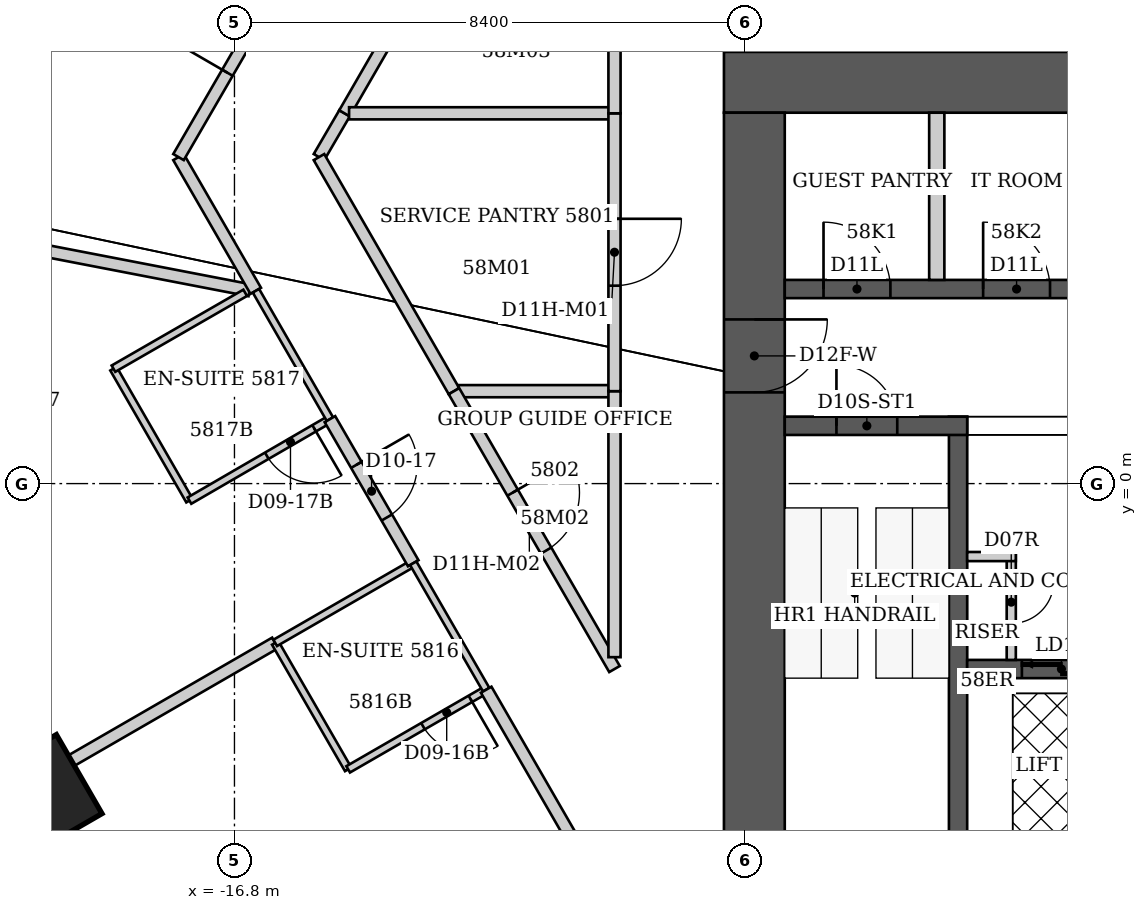
"""IFC4 building model, lengths in metres.
Left out: names, types, materials, properties, quantities, classifications, styles, units other than length and angle.
Written with IfcOpenShell. Run it as: python <this file> out.ifc"""

import sys

from ifc_helpers import new_model, si_unit, direction, frame, frame_2d, origin, origin_2d, place, context, subcontext, project, spatial, rectangle, extrude, element, fill, save


model = new_model("IFC4")
c1 = context("Model", 3, precision=1e-05, world=origin(), true_north=direction((0.0, 1.0)))
c2 = subcontext(c1, "Body", "Model", "MODEL_VIEW")
j1 = project(units=[si_unit("LENGTHUNIT", "METRE"), si_unit("PLANEANGLEUNIT", "RADIAN")], contexts=[c1])
p1 = place(None, origin())
s1 = spatial("IfcSite", under=j1, at=p1, CompositionType="ELEMENT")
p2 = place(p1, origin())
s2 = spatial("IfcBuilding", under=s1, at=p2, CompositionType="ELEMENT")
p3 = place(p2, frame((0.0, 0.0, 232.6)))
s3 = spatial("IfcBuildingStorey", under=s2, at=p3, CompositionType="ELEMENT", Elevation=232.6)
p4 = place(p3, frame((-20.003, -5.153, -0.052), z_axis=(0.054858228661, 0.014110017291, 0.998394452188), x_axis=(-0.86451511653, -0.499636332881, 0.054563249145)))
e1 = element("IfcColumn", 1, at=p4, inside=s3, PredefinedType="COLUMN", context=c2, shape_type="SweptSolid", body=[
    extrude(rectangle(XDim=1.5, YDim=1.5, at=origin_2d()), origin(), (0.0, 0.0, 1.0), 3.858),
])
p5 = place(p3, frame((-8.75, 6.6, 0.0), z_axis=(0.0, 0.0, 1.0), x_axis=(1.0, 0.0, 0.0)))
e2 = element("IfcWall", 2, at=p5, inside=s3, PredefinedType="SHEAR", context=c2, shape_type="SweptSolid", body=[
    extrude(rectangle(XDim=17.5, YDim=1.0, at=frame_2d((8.75, 0.0))), origin(), (0.0, 0.0, 1.0), 3.8),
])
p6 = place(p5, frame((6.887, 0.0, 0.0)))
e3 = element("IfcOpeningElement", 3, at=p6, cuts=e2, PredefinedType="OPENING", context=c2, shape_type="SweptSolid", body=[
    extrude(rectangle(XDim=1.1, YDim=2.1, at=frame_2d((0.55, 1.05))), frame((0.0, 0.5, 0.0), z_axis=(0.0, -1.0, 0.0), x_axis=(1.0, 0.0, 0.0)), (0.0, 0.0, 1.0), 1.0),
])
p7 = place(p5, frame((9.512, 0.0, 0.0)))
e4 = element("IfcOpeningElement", 4, at=p7, cuts=e2, PredefinedType="OPENING", context=c2, shape_type="SweptSolid", body=[
    extrude(rectangle(XDim=1.1, YDim=2.1, at=frame_2d((0.55, 1.05))), frame((0.0, 0.5, 0.0), z_axis=(0.0, -1.0, 0.0), x_axis=(1.0, 0.0, 0.0)), (0.0, 0.0, 1.0), 1.0),
])
p8 = place(p5, frame((12.137, 0.0, 0.0)))
e5 = element("IfcOpeningElement", 5, at=p8, cuts=e2, PredefinedType="OPENING", context=c2, shape_type="SweptSolid", body=[
    extrude(rectangle(XDim=1.1, YDim=2.1, at=frame_2d((0.55, 1.05))), frame((0.0, 0.5, 0.0), z_axis=(0.0, -1.0, 0.0), x_axis=(1.0, 0.0, 0.0)), (0.0, 0.0, 1.0), 1.0),
])
p9 = place(p5, frame((14.762, 0.0, 0.0)))
e6 = element("IfcOpeningElement", 6, at=p9, cuts=e2, PredefinedType="OPENING", context=c2, shape_type="SweptSolid", body=[
    extrude(rectangle(XDim=1.1, YDim=2.1, at=frame_2d((0.55, 1.05))), frame((0.0, 0.5, 0.0), z_axis=(0.0, -1.0, 0.0), x_axis=(1.0, 0.0, 0.0)), (0.0, 0.0, 1.0), 1.0),
])
p10 = place(p3, frame((-8.25, -6.1, 0.0), z_axis=(0.0, 0.0, 1.0), x_axis=(0.0, 1.0, 0.0)))
e7 = element("IfcWall", 7, at=p10, inside=s3, PredefinedType="SHEAR", context=c2, shape_type="SweptSolid", body=[
    extrude(rectangle(XDim=12.2, YDim=1.0, at=frame_2d((6.1, 0.0))), origin(), (0.0, 0.0, 1.0), 3.8),
])
p11 = place(p10, frame((7.6, 0.0, 0.0)))
e8 = element("IfcOpeningElement", 8, at=p11, cuts=e7, PredefinedType="OPENING", context=c2, shape_type="SweptSolid", body=[
    extrude(rectangle(XDim=1.2, YDim=2.2, at=frame_2d((0.6, 1.1))), frame((0.0, 0.5, 0.0), z_axis=(0.0, -1.0, 0.0), x_axis=(1.0, 0.0, 0.0)), (0.0, 0.0, 1.0), 1.0),
])
p12 = place(p3, frame((-4.9, -6.1, 0.0), z_axis=(0.0, 0.0, 1.0), x_axis=(0.0, 1.0, 0.0)))
e9 = element("IfcWall", 9, at=p12, inside=s3, PredefinedType="SHEAR", context=c2, shape_type="SweptSolid", body=[
    extrude(rectangle(XDim=7.2, YDim=0.3, at=frame_2d((3.6, 0.0))), origin(), (0.0, 0.0, 1.0), 3.8),
])
p13 = place(p3, frame((-7.75, 0.95, 0.0), z_axis=(0.0, 0.0, 1.0), x_axis=(1.0, 0.0, 0.0)))
e10 = element("IfcWall", 10, at=p13, inside=s3, PredefinedType="SHEAR", context=c2, shape_type="SweptSolid", body=[
    extrude(rectangle(XDim=3.0, YDim=0.3, at=frame_2d((1.5, 0.0))), origin(), (0.0, 0.0, 1.0), 3.8),
])
p14 = place(p13, frame((0.85, 0.0, 0.0)))
e11 = element("IfcOpeningElement", 11, at=p14, cuts=e10, PredefinedType="OPENING", context=c2, shape_type="SweptSolid", body=[
    extrude(rectangle(XDim=1.0, YDim=2.2, at=frame_2d((0.5, 1.1))), frame((0.0, 0.15, 0.0), z_axis=(0.0, -1.0, 0.0), x_axis=(1.0, 0.0, 0.0)), (0.0, 0.0, 1.0), 0.3),
])
p15 = place(p3, frame((-4.75, -3.05, 0.0), z_axis=(0.0, 0.0, 1.0), x_axis=(1.0, 0.0, 0.0)))
e12 = element("IfcWall", 12, at=p15, inside=s3, PredefinedType="SHEAR", context=c2, shape_type="SweptSolid", body=[
    extrude(rectangle(XDim=3.1, YDim=0.3, at=frame_2d((1.55, 0.0))), origin(), (0.0, 0.0, 1.0), 3.8),
])
p16 = place(p15, frame((0.9, 0.0, 0.0)))
e13 = element("IfcOpeningElement", 13, at=p16, cuts=e12, PredefinedType="OPENING", context=c2, shape_type="SweptSolid", body=[
    extrude(rectangle(XDim=1.3, YDim=2.1, at=frame_2d((0.65, 1.05))), frame((0.0, 0.15, 0.0), z_axis=(0.0, -1.0, 0.0), x_axis=(1.0, 0.0, 0.0)), (0.0, 0.0, 1.0), 0.3),
])
p17 = place(p3, frame((-7.75, 3.2, 0.0), z_axis=(0.0, 0.0, 1.0), x_axis=(1.0, 0.0, 0.0)))
e14 = element("IfcWall", 14, at=p17, inside=s3, PredefinedType="SHEAR", context=c2, shape_type="SweptSolid", body=[
    extrude(rectangle(XDim=15.5, YDim=0.3, at=frame_2d((7.75, 0.0))), origin(), (0.0, 0.0, 1.0), 3.8),
])
p18 = place(p17, frame((0.637, 0.0, 0.0)))
e15 = element("IfcOpeningElement", 15, at=p18, cuts=e14, PredefinedType="OPENING", context=c2, shape_type="SweptSolid", body=[
    extrude(rectangle(XDim=1.1, YDim=2.2, at=frame_2d((0.55, 1.1))), frame((0.0, 0.15, 0.0), z_axis=(0.0, -1.0, 0.0), x_axis=(1.0, 0.0, 0.0)), (0.0, 0.0, 1.0), 0.3),
])
p19 = place(p17, frame((3.262, 0.0, 0.0)))
e16 = element("IfcOpeningElement", 16, at=p19, cuts=e14, PredefinedType="OPENING", context=c2, shape_type="SweptSolid", body=[
    extrude(rectangle(XDim=1.1, YDim=2.2, at=frame_2d((0.55, 1.1))), frame((0.0, 0.15, 0.0), z_axis=(0.0, -1.0, 0.0), x_axis=(1.0, 0.0, 0.0)), (0.0, 0.0, 1.0), 0.3),
])
p20 = place(p3, frame((-5.25, 3.35, 0.0), z_axis=(0.0, 0.0, 1.0), x_axis=(0.0, 1.0, 0.0)))
e17 = element("IfcWall", 17, at=p20, inside=s3, PredefinedType="PARTITIONING", context=c2, shape_type="SweptSolid", body=[
    extrude(rectangle(XDim=2.75, YDim=0.25, at=frame_2d((1.375, 0.0))), origin(), (0.0, 0.0, 1.0), 3.8),
])
p21 = place(p3, frame((-27.041, 5.204, 0.0), z_axis=(0.0, 0.0, 1.0), x_axis=(0.981884490433, -0.18948046719, 0.0)))
e18 = element("IfcWall", 18, at=p21, inside=s3, PredefinedType="PARTITIONING", context=c2, shape_type="SweptSolid", body=[
    extrude(rectangle(XDim=10.684, YDim=0.2, at=frame_2d((5.342, 0.0))), origin(), (0.0, 0.0, 1.0), 3.64),
])
p22 = place(p3, frame((-21.116, -5.5, 0.0), z_axis=(0.0, 0.0, 1.0), x_axis=(0.865919350456, 0.50018364478, 0.0)))
e19 = element("IfcWall", 19, at=p22, inside=s3, PredefinedType="PARTITIONING", context=c2, shape_type="SweptSolid", body=[
    extrude(rectangle(XDim=5.758, YDim=0.2, at=frame_2d((2.879, 0.0))), origin(), (0.0, 0.0, 1.0), 3.64),
])
p23 = place(p3, frame((-18.79, 1.89, 0.0), z_axis=(0.0, 0.0, 1.0), x_axis=(0.499159685399, -0.866510016372, 0.0)))
e20 = element("IfcWall", 20, at=p23, inside=s3, PredefinedType="PARTITIONING", context=c2, shape_type="SweptSolid", body=[
    extrude(rectangle(XDim=2.504, YDim=0.12, at=frame_2d((1.252, 0.0))), origin(), (0.0, 0.0, 1.0), 3.64),
])
p24 = place(p3, frame((-17.72, 5.37, 0.0), z_axis=(0.0, 0.0, 1.0), x_axis=(0.499922110319, -0.866070368743, 0.0)))
e21 = element("IfcWall", 21, at=p24, inside=s3, PredefinedType="PARTITIONING", context=c2, shape_type="SweptSolid", body=[
    extrude(rectangle(XDim=2.541, YDim=0.2, at=frame_2d((1.27, 0.0))), origin(), (0.0, 0.0, 1.0), 3.64),
])
p25 = place(p3, frame((-17.72, 5.37, 0.0), z_axis=(0.0, 0.0, 1.0), x_axis=(0.501491408171, 0.865162624904, 0.0)))
e22 = element("IfcWall", 22, at=p25, inside=s3, PredefinedType="PARTITIONING", context=c2, shape_type="SweptSolid", body=[
    extrude(rectangle(XDim=4.207, YDim=0.2, at=frame_2d((2.104, 0.0))), origin(), (0.0, 0.0, 1.0), 3.64),
])
p26 = place(p25, frame((1.604, 0.0, 0.0)))
e23 = element("IfcOpeningElement", 23, at=p26, cuts=e22, PredefinedType="OPENING", context=c2, shape_type="SweptSolid", body=[
    extrude(rectangle(XDim=1.0, YDim=2.13, at=frame_2d((0.5, 1.065))), frame((0.0, 0.1, 0.0), z_axis=(0.0, -1.0, 0.0), x_axis=(1.0, 0.0, 0.0)), (0.0, 0.0, 1.0), 0.2),
])
p27 = place(p3, frame((-17.54, -0.28, 0.0), z_axis=(0.0, 0.0, 1.0), x_axis=(0.86498992408, 0.501789229896, 0.0)))
e24 = element("IfcWall", 24, at=p27, inside=s3, PredefinedType="PARTITIONING", context=c2, shape_type="SweptSolid", body=[
    extrude(rectangle(XDim=2.671, YDim=0.12, at=frame_2d((1.335, 0.0))), origin(), (0.0, 0.0, 1.0), 3.64),
])
p28 = place(p27, frame((1.47, 0.0, 0.0)))
e25 = element("IfcOpeningElement", 25, at=p28, cuts=e24, PredefinedType="OPENING", context=c2, shape_type="SweptSolid", body=[
    extrude(rectangle(XDim=0.9, YDim=2.03, at=frame_2d((0.45, 1.015))), frame((0.0, 0.06, 0.0), z_axis=(0.0, -1.0, 0.0), x_axis=(1.0, 0.0, 0.0)), (0.0, 0.0, 1.0), 0.12),
])
p29 = place(p3, frame((-16.624, 3.138, 0.0), z_axis=(0.0, 0.0, 1.0), x_axis=(-0.866525185869, -0.499133351175, 0.0)))
e26 = element("IfcWall", 26, at=p29, inside=s3, PredefinedType="PARTITIONING", context=c2, shape_type="SweptSolid", body=[
    extrude(rectangle(XDim=2.5, YDim=0.12, at=frame_2d((1.25, 0.0))), origin(), (0.0, 0.0, 1.0), 3.038),
])
p30 = place(p3, frame((-16.447, 3.172, 0.0), z_axis=(0.0, 0.0, 1.0), x_axis=(0.499242543719, -0.86646227993, 0.0)))
e27 = element("IfcWall", 27, at=p30, inside=s3, PredefinedType="PARTITIONING", context=c2, shape_type="SweptSolid", body=[
    extrude(rectangle(XDim=2.437, YDim=0.12, at=frame_2d((1.219, 0.0))), origin(), (0.0, 0.0, 1.0), 3.64),
])
p31 = place(p3, frame((-16.13, -2.62, 0.0), z_axis=(0.0, 0.0, 1.0), x_axis=(0.499737123639, -0.866177122335, 0.0)))
e28 = element("IfcWall", 28, at=p31, inside=s3, PredefinedType="PARTITIONING", context=c2, shape_type="SweptSolid", body=[
    extrude(rectangle(XDim=2.401, YDim=0.12, at=frame_2d((1.201, 0.0))), origin(), (0.0, 0.0, 1.0), 3.64),
])
p32 = place(p3, frame((-16.13, -2.62, 0.0), z_axis=(0.0, 0.0, 1.0), x_axis=(0.866114241029, 0.499846097802, 0.0)))
e29 = element("IfcWall", 29, at=p32, inside=s3, PredefinedType="PARTITIONING", context=c2, shape_type="SweptSolid", body=[
    extrude(rectangle(XDim=2.621, YDim=0.12, at=frame_2d((1.311, 0.0))), origin(), (0.0, 0.0, 1.0), 3.64),
])
p33 = place(p3, frame((-15.41, 5.37, 0.0), z_axis=(0.0, 0.0, 1.0), x_axis=(0.503943891868, 0.863736391412, 0.0)))
e30 = element("IfcWall", 30, at=p33, inside=s3, PredefinedType="PARTITIONING", context=c2, shape_type="SweptSolid", body=[
    extrude(rectangle(XDim=0.833, YDim=0.2, at=frame_2d((0.417, 0.0))), origin(), (0.0, 0.0, 1.0), 3.64),
])
p34 = place(p3, frame((-15.23, 1.06, 0.0), z_axis=(0.0, 0.0, 1.0), x_axis=(0.500406860043, -0.865790375565, 0.0)))
e31 = element("IfcWall", 31, at=p34, inside=s3, PredefinedType="PARTITIONING", context=c2, shape_type="SweptSolid", body=[
    extrude(rectangle(XDim=2.738, YDim=0.2, at=frame_2d((1.369, 0.0))), origin(), (0.0, 0.0, 1.0), 3.64),
])
p35 = place(p34, frame((0.869, 0.0, 0.0)))
e32 = element("IfcOpeningElement", 32, at=p35, cuts=e31, PredefinedType="OPENING", context=c2, shape_type="SweptSolid", body=[
    extrude(rectangle(XDim=1.0, YDim=2.13, at=frame_2d((0.5, 1.065))), frame((0.0, 0.1, 0.0), z_axis=(0.0, -1.0, 0.0), x_axis=(1.0, 0.0, 0.0)), (0.0, 0.0, 1.0), 0.2),
])
p36 = place(p3, frame((-14.99, 6.09, 0.0), z_axis=(0.0, 0.0, 1.0), x_axis=(0.500213626659, 0.86590203124, 0.0)))
e33 = element("IfcWall", 33, at=p36, inside=s3, PredefinedType="PARTITIONING", context=c2, shape_type="SweptSolid", body=[
    extrude(rectangle(XDim=5.278, YDim=0.2, at=frame_2d((2.639, 0.0))), origin(), (0.0, 0.0, 1.0), 3.64),
])
p37 = place(p3, frame((-14.93, -4.7, 0.0), z_axis=(0.0, 0.0, 1.0), x_axis=(0.866114241029, 0.499846097802, 0.0)))
e34 = element("IfcWall", 34, at=p37, inside=s3, PredefinedType="PARTITIONING", context=c2, shape_type="SweptSolid", body=[
    extrude(rectangle(XDim=2.621, YDim=0.12, at=frame_2d((1.311, 0.0))), origin(), (0.0, 0.0, 1.0), 3.64),
])
p38 = place(p37, frame((1.421, 0.0, 0.0)))
e35 = element("IfcOpeningElement", 35, at=p38, cuts=e34, PredefinedType="OPENING", context=c2, shape_type="SweptSolid", body=[
    extrude(rectangle(XDim=0.9, YDim=2.03, at=frame_2d((0.45, 1.015))), frame((0.0, 0.06, 0.0), z_axis=(0.0, -1.0, 0.0), x_axis=(1.0, 0.0, 0.0)), (0.0, 0.0, 1.0), 0.12),
])
p39 = place(p3, frame((-14.915, 6.09, 0.0), z_axis=(0.0, 0.0, 1.0), x_axis=(1.0, 0.0, 0.0)))
e36 = element("IfcWall", 36, at=p39, inside=s3, PredefinedType="PARTITIONING", context=c2, shape_type="SweptSolid", body=[
    extrude(rectangle(XDim=4.355, YDim=0.2, at=frame_2d((2.177, 0.0))), origin(), (0.0, 0.0, 1.0), 3.64),
])
p40 = place(p3, frame((-13.86, -1.31, 0.0), z_axis=(0.0, 0.0, 1.0), x_axis=(0.499813401482, -0.866133109688, 0.0)))
e37 = element("IfcWall", 37, at=p40, inside=s3, PredefinedType="PARTITIONING", context=c2, shape_type="SweptSolid", body=[
    extrude(rectangle(XDim=2.401, YDim=0.12, at=frame_2d((1.201, 0.0))), origin(), (0.0, 0.0, 1.0), 3.64),
])
p41 = place(p3, frame((-13.19, 1.52, 0.0), z_axis=(0.0, 0.0, 1.0), x_axis=(-0.499513190454, 0.866306281036, 0.0)))
e38 = element("IfcWall", 38, at=p41, inside=s3, PredefinedType="PARTITIONING", context=c2, shape_type="SweptSolid", body=[
    extrude(rectangle(XDim=4.444, YDim=0.2, at=frame_2d((2.222, 0.0))), origin(), (0.0, 0.0, 1.0), 3.64),
])
p42 = place(p3, frame((-12.66, -3.39, 0.0), z_axis=(0.0, 0.0, 1.0), x_axis=(0.499511590934, -0.866307203319, 0.0)))
e39 = element("IfcWall", 39, at=p42, inside=s3, PredefinedType="PARTITIONING", context=c2, shape_type="SweptSolid", body=[
    extrude(rectangle(XDim=9.189, YDim=0.2, at=frame_2d((4.594, 0.0))), origin(), (0.0, 0.0, 1.0), 3.64),
])
p43 = place(p42, frame((4.094, 0.0, 0.0)))
e40 = element("IfcOpeningElement", 40, at=p43, cuts=e39, PredefinedType="OPENING", context=c2, shape_type="SweptSolid", body=[
    extrude(rectangle(XDim=1.0, YDim=2.13, at=frame_2d((0.5, 1.065))), frame((0.0, 0.1, 0.0), z_axis=(0.0, -1.0, 0.0), x_axis=(1.0, 0.0, 0.0)), (0.0, 0.0, 1.0), 0.2),
])
p44 = place(p3, frame((-10.56, 1.52, 0.0), z_axis=(0.0, 0.0, 1.0), x_axis=(-1.0, 0.0, 0.0)))
e41 = element("IfcWall", 41, at=p44, inside=s3, PredefinedType="PARTITIONING", context=c2, shape_type="SweptSolid", body=[
    extrude(rectangle(XDim=2.56, YDim=0.2, at=frame_2d((1.28, 0.0))), origin(), (0.0, 0.0, 1.0), 3.64),
])
p45 = place(p3, frame((-10.55, -3.05, 0.0), z_axis=(0.0, 0.0, 1.0), x_axis=(-0.500193590286, 0.865913605527, 0.0)))
e42 = element("IfcWall", 42, at=p45, inside=s3, PredefinedType="PARTITIONING", context=c2, shape_type="SweptSolid", body=[
    extrude(rectangle(XDim=5.278, YDim=0.2, at=frame_2d((2.639, 0.0))), origin(), (0.0, 0.0, 1.0), 3.64),
])
p46 = place(p45, frame((2.25, 0.0, 0.0)))
e43 = element("IfcOpeningElement", 43, at=p46, cuts=e42, PredefinedType="OPENING", context=c2, shape_type="SweptSolid", body=[
    extrude(rectangle(XDim=1.1, YDim=2.2, at=frame_2d((0.55, 1.1))), frame((0.0, 0.1, 0.0), z_axis=(0.0, -1.0, 0.0), x_axis=(1.0, 0.0, 0.0)), (0.0, 0.0, 1.0), 0.2),
])
p47 = place(p3, frame((-10.55, 1.52, 0.0), z_axis=(0.0, 0.0, 1.0), x_axis=(0.0, -1.0, 0.0)))
e44 = element("IfcWall", 44, at=p47, inside=s3, PredefinedType="PARTITIONING", context=c2, shape_type="SweptSolid", body=[
    extrude(rectangle(XDim=4.375, YDim=0.2, at=frame_2d((2.188, 0.0))), origin(), (0.0, 0.0, 1.0), 3.64),
])
p48 = place(p3, frame((-10.55, 6.09, 0.0), z_axis=(0.0, 0.0, 1.0), x_axis=(0.0, -1.0, 0.0)))
e45 = element("IfcWall", 45, at=p48, inside=s3, PredefinedType="PARTITIONING", context=c2, shape_type="SweptSolid", body=[
    extrude(rectangle(XDim=4.57, YDim=0.2, at=frame_2d((2.285, 0.0))), origin(), (0.0, 0.0, 1.0), 3.64),
])
p49 = place(p48, frame((1.735, 0.0, 0.0)))
e46 = element("IfcOpeningElement", 46, at=p49, cuts=e45, PredefinedType="OPENING", context=c2, shape_type="SweptSolid", body=[
    extrude(rectangle(XDim=1.1, YDim=2.2, at=frame_2d((0.55, 1.1))), frame((0.0, 0.1, 0.0), z_axis=(0.0, -1.0, 0.0), x_axis=(1.0, 0.0, 0.0)), (0.0, 0.0, 1.0), 0.2),
])
p50 = place(p3, frame((-10.55, 8.89, 0.0), z_axis=(0.0, 0.0, 1.0), x_axis=(0.0, -1.0, 0.0)))
e47 = element("IfcWall", 47, at=p50, inside=s3, PredefinedType="PARTITIONING", context=c2, shape_type="SweptSolid", body=[
    extrude(rectangle(XDim=2.8, YDim=0.2, at=frame_2d((1.4, 0.0))), origin(), (0.0, 0.0, 1.0), 3.64),
])
p51 = place(p3, frame((-4.025, -2.9, 0.0), z_axis=(0.0, 0.0, 1.0), x_axis=(0.0, 1.0, 0.0)))
e48 = element("IfcWall", 48, at=p51, inside=s3, PredefinedType="PARTITIONING", context=c2, shape_type="SweptSolid", body=[
    extrude(rectangle(XDim=1.775, YDim=0.15, at=frame_2d((0.887, 0.0))), origin(), (0.0, 0.0, 1.0), 3.64),
])
p52 = place(p51, frame((0.6, 0.0, 0.0)))
e49 = element("IfcOpeningElement", 49, at=p52, cuts=e48, PredefinedType="OPENING", context=c2, shape_type="SweptSolid", body=[
    extrude(rectangle(XDim=0.7, YDim=2.1, at=frame_2d((0.35, 1.05))), frame((0.0, 0.075, 0.0), z_axis=(0.0, -1.0, 0.0), x_axis=(1.0, 0.0, 0.0)), (0.0, 0.0, 1.0), 0.15),
])
p53 = place(p3, frame((-4.75, -1.2, 0.0), z_axis=(0.0, 0.0, 1.0), x_axis=(1.0, 0.0, 0.0)))
e50 = element("IfcWall", 50, at=p53, inside=s3, PredefinedType="PARTITIONING", context=c2, shape_type="SweptSolid", body=[
    extrude(rectangle(XDim=0.8, YDim=0.15, at=frame_2d((0.4, 0.0))), origin(), (0.0, 0.0, 1.0), 3.64),
])
p54 = place(p38, origin())
e51 = element("IfcDoor", 51, at=p54, inside=s3, OperationType="SINGLE_SWING_RIGHT", PredefinedType="DOOR", context=c2, shape_type="SweptSolid", body=[
    extrude(rectangle(XDim=0.9, YDim=2.03, at=frame_2d((0.45, 1.015))), frame((0.0, 0.025, 0.0), z_axis=(0.0, -1.0, 0.0), x_axis=(1.0, 0.0, 0.0)), (0.0, 0.0, 1.0), 0.05),
])
fill(e35, e51)
p55 = place(p35, origin())
e52 = element("IfcDoor", 52, at=p55, inside=s3, OperationType="SINGLE_SWING_LEFT", PredefinedType="DOOR", context=c2, shape_type="SweptSolid", body=[
    extrude(rectangle(XDim=1.0, YDim=2.13, at=frame_2d((0.5, 1.065))), frame((0.0, 0.025, 0.0), z_axis=(0.0, -1.0, 0.0), x_axis=(1.0, 0.0, 0.0)), (0.0, 0.0, 1.0), 0.05),
])
fill(e32, e52)
p56 = place(p28, origin())
e53 = element("IfcDoor", 53, at=p56, inside=s3, OperationType="SINGLE_SWING_RIGHT", PredefinedType="DOOR", context=c2, shape_type="SweptSolid", body=[
    extrude(rectangle(XDim=0.9, YDim=2.03, at=frame_2d((0.45, 1.015))), frame((0.0, 0.025, 0.0), z_axis=(0.0, -1.0, 0.0), x_axis=(1.0, 0.0, 0.0)), (0.0, 0.0, 1.0), 0.05),
])
fill(e25, e53)
p57 = place(p26, origin())
e54 = element("IfcDoor", 54, at=p57, inside=s3, OperationType="SINGLE_SWING_LEFT", PredefinedType="DOOR", context=c2, shape_type="SweptSolid", body=[
    extrude(rectangle(XDim=1.0, YDim=2.13, at=frame_2d((0.5, 1.065))), frame((0.0, 0.025, 0.0), z_axis=(0.0, -1.0, 0.0), x_axis=(1.0, 0.0, 0.0)), (0.0, 0.0, 1.0), 0.05),
])
fill(e23, e54)
p58 = place(p49, origin())
e55 = element("IfcDoor", 55, at=p58, inside=s3, OperationType="SINGLE_SWING_LEFT", PredefinedType="DOOR", context=c2, shape_type="SweptSolid", body=[
    extrude(rectangle(XDim=1.1, YDim=2.2, at=frame_2d((0.55, 1.1))), frame((0.0, 0.025, 0.0), z_axis=(0.0, -1.0, 0.0), x_axis=(1.0, 0.0, 0.0)), (0.0, 0.0, 1.0), 0.05),
])
fill(e46, e55)
p59 = place(p46, origin())
e56 = element("IfcDoor", 56, at=p59, inside=s3, OperationType="SINGLE_SWING_RIGHT", PredefinedType="DOOR", context=c2, shape_type="SweptSolid", body=[
    extrude(rectangle(XDim=1.1, YDim=2.2, at=frame_2d((0.55, 1.1))), frame((0.0, 0.025, 0.0), z_axis=(0.0, -1.0, 0.0), x_axis=(1.0, 0.0, 0.0)), (0.0, 0.0, 1.0), 0.05),
])
fill(e43, e56)
p60 = place(p14, origin())
e57 = element("IfcDoor", 57, at=p60, inside=s3, OperationType="SINGLE_SWING_LEFT", PredefinedType="DOOR", context=c2, shape_type="SweptSolid", body=[
    extrude(rectangle(XDim=1.0, YDim=2.2, at=frame_2d((0.5, 1.1))), frame((0.0, 0.025, 0.0), z_axis=(0.0, -1.0, 0.0), x_axis=(1.0, 0.0, 0.0)), (0.0, 0.0, 1.0), 0.05),
])
fill(e11, e57)
p61 = place(p11, origin())
e58 = element("IfcDoor", 58, at=p61, inside=s3, OperationType="SINGLE_SWING_RIGHT", PredefinedType="DOOR", context=c2, shape_type="SweptSolid", body=[
    extrude(rectangle(XDim=1.2, YDim=2.2, at=frame_2d((0.6, 1.1))), frame((0.0, 0.025, 0.0), z_axis=(0.0, -1.0, 0.0), x_axis=(1.0, 0.0, 0.0)), (0.0, 0.0, 1.0), 0.05),
])
fill(e8, e58)
p62 = place(p52, origin())
e59 = element("IfcDoor", 59, at=p62, inside=s3, OperationType="SINGLE_SWING_RIGHT", PredefinedType="DOOR", context=c2, shape_type="SweptSolid", body=[
    extrude(rectangle(XDim=0.7, YDim=2.1, at=frame_2d((0.35, 1.05))), frame((0.0, 0.025, 0.0), z_axis=(0.0, -1.0, 0.0), x_axis=(1.0, 0.0, 0.0)), (0.0, 0.0, 1.0), 0.05),
])
fill(e49, e59)
p63 = place(p18, origin())
e60 = element("IfcDoor", 60, at=p63, inside=s3, OperationType="SINGLE_SWING_LEFT", PredefinedType="DOOR", context=c2, shape_type="SweptSolid", body=[
    extrude(rectangle(XDim=1.1, YDim=2.2, at=frame_2d((0.55, 1.1))), frame((0.0, 0.025, 0.0), z_axis=(0.0, -1.0, 0.0), x_axis=(1.0, 0.0, 0.0)), (0.0, 0.0, 1.0), 0.05),
])
fill(e15, e60)
p64 = place(p19, origin())
e61 = element("IfcDoor", 61, at=p64, inside=s3, OperationType="SINGLE_SWING_LEFT", PredefinedType="DOOR", context=c2, shape_type="SweptSolid", body=[
    extrude(rectangle(XDim=1.1, YDim=2.2, at=frame_2d((0.55, 1.1))), frame((0.0, 0.025, 0.0), z_axis=(0.0, -1.0, 0.0), x_axis=(1.0, 0.0, 0.0)), (0.0, 0.0, 1.0), 0.05),
])
fill(e16, e61)
p65 = place(p16, origin())
e62 = element("IfcDoor", 62, at=p65, inside=s3, OperationType="DOUBLE_DOOR_SLIDING", PredefinedType="DOOR", context=c2, shape_type="SweptSolid", body=[
    extrude(rectangle(XDim=1.3, YDim=2.1, at=frame_2d((0.65, 1.05))), frame((0.0, 0.025, 0.0), z_axis=(0.0, -1.0, 0.0), x_axis=(1.0, 0.0, 0.0)), (0.0, 0.0, 1.0), 0.05),
])
fill(e13, e62)
save(model, sys.argv[1])
